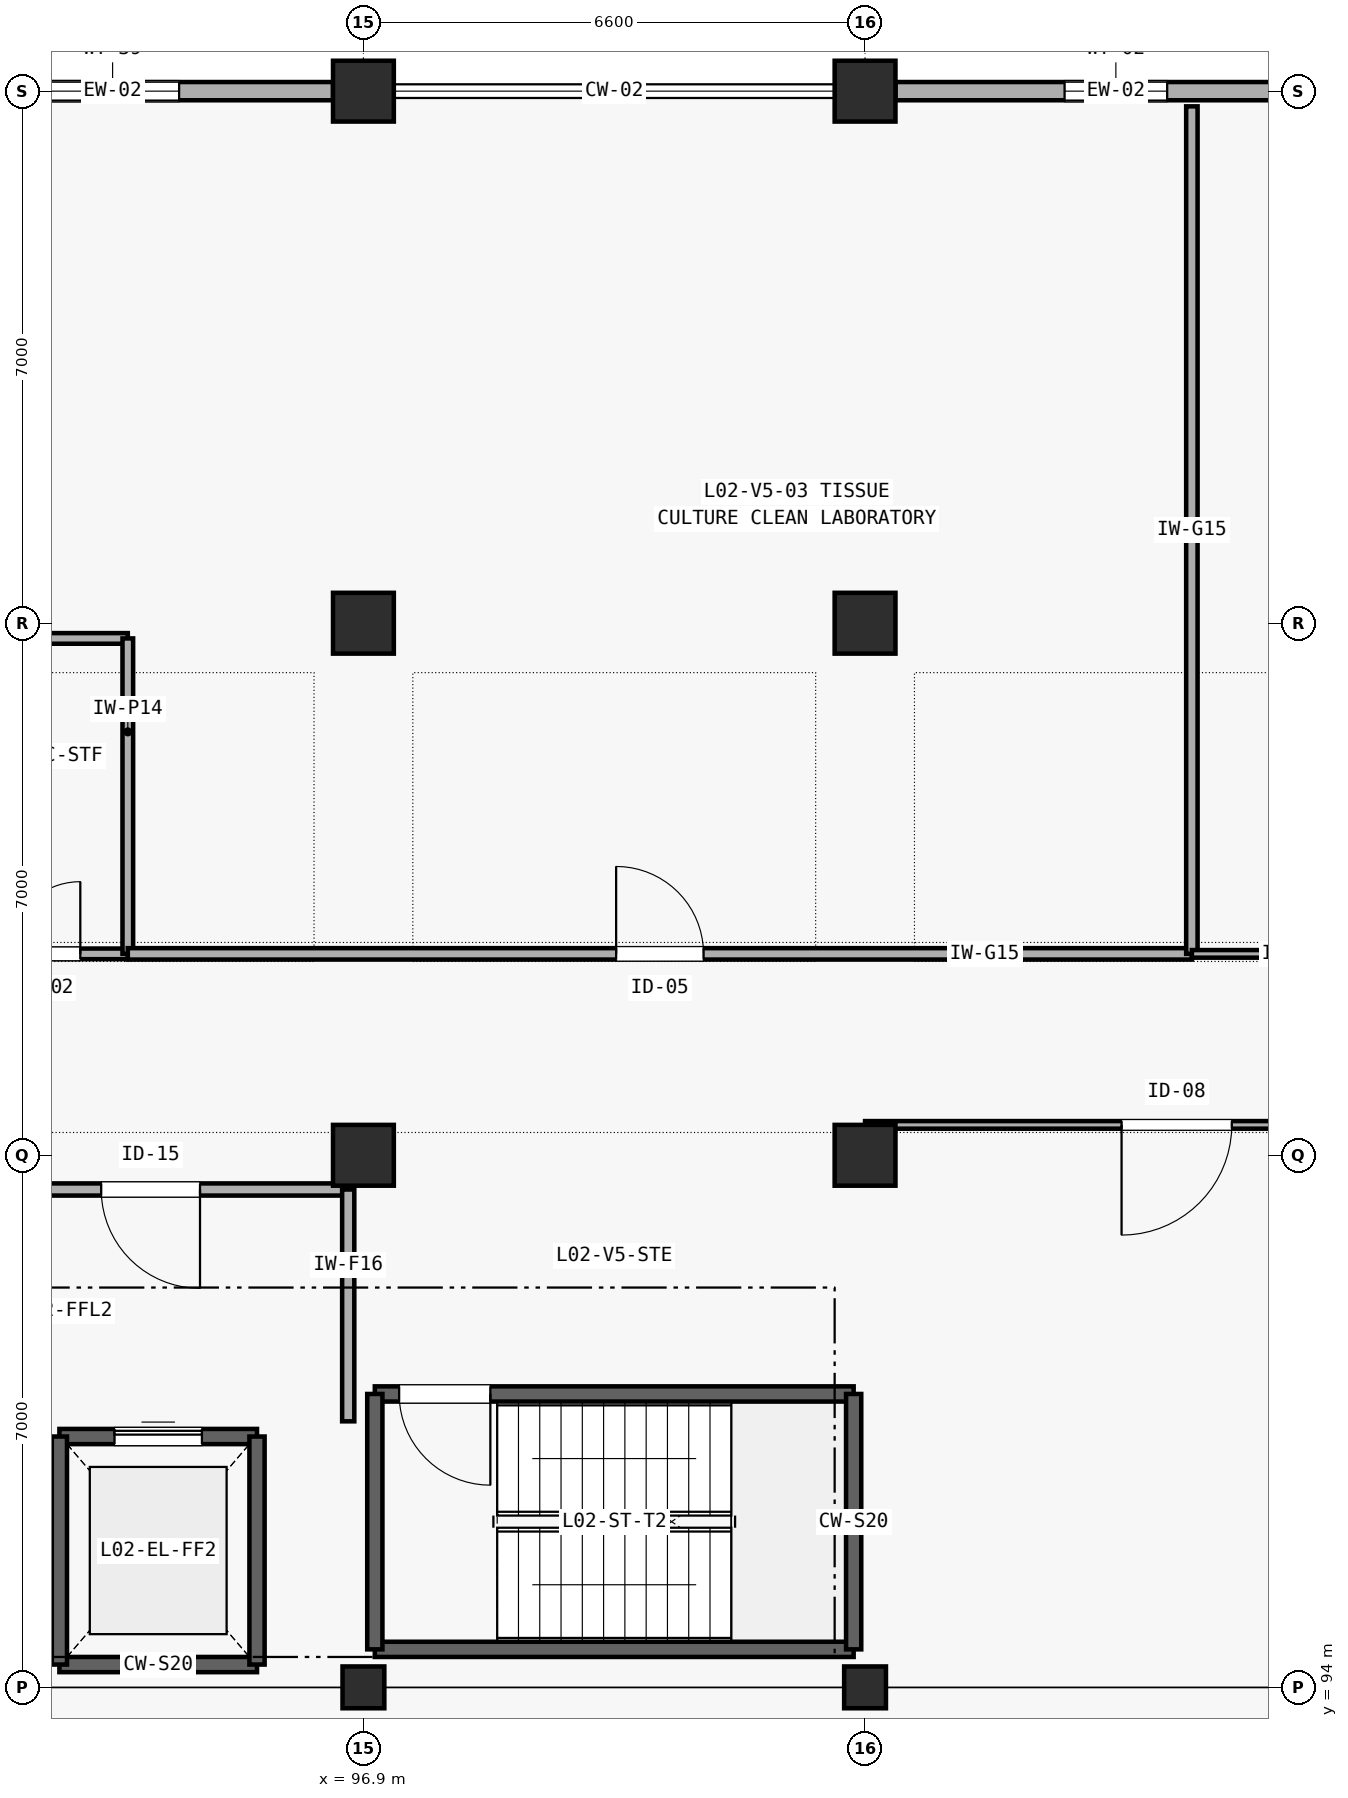
"""IFC4 building model, lengths in metres.
Left out: names, types, materials, properties, quantities, classifications, styles, units other than length and angle.
Written with IfcOpenShell. Run it as: python <this file> out.ifc"""

import sys

from ifc_helpers import new_model, si_unit, direction, frame, frame_2d, origin, origin_2d, place, context, subcontext, project, spatial, rectangle, extrude, element, fill, save


model = new_model("IFC4")
c1 = context("Model", 3, precision=1e-05, world=origin(), true_north=direction((0.0, 1.0)))
c2 = subcontext(c1, "Body", "Model", "MODEL_VIEW")
j1 = project(units=[si_unit("LENGTHUNIT", "METRE"), si_unit("PLANEANGLEUNIT", "RADIAN")], contexts=[c1])
p1 = place(None, origin())
s1 = spatial("IfcSite", under=j1, at=p1, CompositionType="ELEMENT")
p2 = place(p1, origin())
s2 = spatial("IfcBuilding", under=s1, at=p2, CompositionType="ELEMENT")
p3 = place(p2, frame((0.0, 0.0, 8.4)))
s3 = spatial("IfcBuildingStorey", under=s2, at=p3, CompositionType="ELEMENT", Elevation=8.4)
p4 = place(p3, frame((96.9, 94.0, 0.0), z_axis=(0.0, 0.0, 1.0), x_axis=(1.0, 0.0, 0.0)))
e1 = element("IfcColumn", 1, at=p4, inside=s3, PredefinedType="COLUMN", context=c2, shape_type="SweptSolid", body=[
    extrude(rectangle(XDim=0.55, YDim=0.55, at=origin_2d()), origin(), (0.0, 0.0, 1.0), 4.2),
])
for number, where, z_axis, x_axis in (
    (2, (96.9, 101.0, 0.0), (0.0, 0.0, 1.0), (1.0, 0.0, 0.0)),
    (3, (96.9, 108.0, 0.0), (0.0, 0.0, 1.0), (1.0, 0.0, 0.0)),
    (4, (96.9, 115.0, 0.0), (0.0, 0.0, 1.0), (1.0, 0.0, 0.0)),
):
    element("IfcColumn", number, at=place(p3, frame(where, z_axis=z_axis, x_axis=x_axis)), inside=s3, PredefinedType="COLUMN", context=c2, shape_type="SweptSolid", body=[
        extrude(rectangle(XDim=0.8, YDim=0.8, at=origin_2d()), origin(), (0.0, 0.0, 1.0), 4.2),
    ])
p5 = place(p3, frame((103.5, 94.0, 0.0), z_axis=(0.0, 0.0, 1.0), x_axis=(1.0, 0.0, 0.0)))
e5 = element("IfcColumn", 5, at=p5, inside=s3, PredefinedType="COLUMN", context=c2, shape_type="SweptSolid", body=[
    extrude(rectangle(XDim=0.55, YDim=0.55, at=origin_2d()), origin(), (0.0, 0.0, 1.0), 4.2),
])
for number, where, z_axis, x_axis in (
    (6, (103.5, 101.0, 0.0), (0.0, 0.0, 1.0), (1.0, 0.0, 0.0)),
    (7, (103.5, 108.0, 0.0), (0.0, 0.0, 1.0), (1.0, 0.0, 0.0)),
    (8, (103.5, 115.0, 0.0), (0.0, 0.0, 1.0), (1.0, 0.0, 0.0)),
):
    element("IfcColumn", number, at=place(p3, frame(where, z_axis=z_axis, x_axis=x_axis)), inside=s3, PredefinedType="COLUMN", context=c2, shape_type="SweptSolid", body=[
        extrude(rectangle(XDim=0.8, YDim=0.8, at=origin_2d()), origin(), (0.0, 0.0, 1.0), 4.2),
    ])
p6 = place(p3, frame((90.7, 115.0, 0.0), z_axis=(0.0, 0.0, 1.0), x_axis=(1.0, 0.0, 0.0)))
e9 = element("IfcWall", 9, at=p6, inside=s3, PredefinedType="SOLIDWALL", context=c2, shape_type="SweptSolid", body=[
    extrude(rectangle(XDim=5.8, YDim=0.24, at=frame_2d((2.9, 0.0))), origin(), (0.0, 0.0, 1.0), 3.365),
])
p7 = place(p6, frame((2.025, 0.0, 0.85)))
e10 = element("IfcOpeningElement", 10, at=p7, cuts=e9, PredefinedType="OPENING", context=c2, shape_type="SweptSolid", body=[
    extrude(rectangle(XDim=1.75, YDim=1.55, at=frame_2d((0.875, 0.775))), frame((0.0, 0.13, 0.0), z_axis=(0.0, -1.0, 0.0), x_axis=(1.0, 0.0, 0.0)), (0.0, 0.0, 1.0), 0.26),
])
p8 = place(p3, frame((103.9, 115.0, 0.0), z_axis=(0.0, 0.0, 1.0), x_axis=(1.0, 0.0, 0.0)))
e11 = element("IfcWall", 11, at=p8, inside=s3, PredefinedType="SOLIDWALL", context=c2, shape_type="SweptSolid", body=[
    extrude(rectangle(XDim=5.8, YDim=0.24, at=frame_2d((2.9, 0.0))), origin(), (0.0, 0.0, 1.0), 3.345),
])
p9 = place(p8, frame((2.225, 0.0, 0.85)))
e12 = element("IfcOpeningElement", 12, at=p9, cuts=e11, PredefinedType="OPENING", context=c2, shape_type="SweptSolid", body=[
    extrude(rectangle(XDim=1.35, YDim=1.35, at=frame_2d((0.675, 0.675))), frame((0.0, 0.13, 0.0), z_axis=(0.0, -1.0, 0.0), x_axis=(1.0, 0.0, 0.0)), (0.0, 0.0, 1.0), 0.26),
])
p10 = place(p3, frame((97.05, 94.5, 0.0), z_axis=(0.0, 0.0, 1.0), x_axis=(1.0, 0.0, 0.0)))
e13 = element("IfcWall", 13, at=p10, inside=s3, PredefinedType="SHEAR", context=c2, shape_type="SweptSolid", body=[
    extrude(rectangle(XDim=6.3, YDim=0.2, at=frame_2d((3.15, 0.0))), origin(), (0.0, 0.0, 1.0), 4.2),
])
p11 = place(p3, frame((97.05, 97.86, 0.0), z_axis=(0.0, 0.0, 1.0), x_axis=(1.0, 0.0, 0.0)))
e14 = element("IfcWall", 14, at=p11, inside=s3, PredefinedType="SHEAR", context=c2, shape_type="SweptSolid", body=[
    extrude(rectangle(XDim=6.3, YDim=0.2, at=frame_2d((3.15, 0.0))), origin(), (0.0, 0.0, 1.0), 4.2),
])
p12 = place(p11, frame((0.32, 0.0, 0.0)))
e15 = element("IfcOpeningElement", 15, at=p12, cuts=e14, PredefinedType="OPENING", context=c2, shape_type="SweptSolid", body=[
    extrude(rectangle(XDim=1.2, YDim=2.15, at=frame_2d((0.6, 1.075))), frame((0.0, 0.11, 0.0), z_axis=(0.0, -1.0, 0.0), x_axis=(1.0, 0.0, 0.0)), (0.0, 0.0, 1.0), 0.22),
])
for number, where, z_axis, x_axis in (
    (16, (97.05, 94.5, 0.0), (0.0, 0.0, 1.0), (0.0, 1.0, 0.0)),
    (17, (103.35, 94.5, 0.0), (0.0, 0.0, 1.0), (0.0, 1.0, 0.0)),
):
    element("IfcWall", number, at=place(p3, frame(where, z_axis=z_axis, x_axis=x_axis)), inside=s3, PredefinedType="SHEAR", context=c2, shape_type="SweptSolid", body=[
        extrude(rectangle(XDim=3.36, YDim=0.2, at=frame_2d((1.68, 0.0))), origin(), (0.0, 0.0, 1.0), 4.2),
    ])
p13 = place(p3, frame((92.9, 94.3, 0.0), z_axis=(0.0, 0.0, 1.0), x_axis=(1.0, 0.0, 0.0)))
e18 = element("IfcWall", 18, at=p13, inside=s3, PredefinedType="SHEAR", context=c2, shape_type="SweptSolid", body=[
    extrude(rectangle(XDim=2.6, YDim=0.2, at=frame_2d((1.3, 0.0))), origin(), (0.0, 0.0, 1.0), 4.2),
])
p14 = place(p3, frame((92.9, 97.3, 0.0), z_axis=(0.0, 0.0, 1.0), x_axis=(1.0, 0.0, 0.0)))
e19 = element("IfcWall", 19, at=p14, inside=s3, PredefinedType="SHEAR", context=c2, shape_type="SweptSolid", body=[
    extrude(rectangle(XDim=2.6, YDim=0.2, at=frame_2d((1.3, 0.0))), origin(), (0.0, 0.0, 1.0), 4.2),
])
p15 = place(p14, frame((0.725, 0.0, 0.0)))
e20 = element("IfcOpeningElement", 20, at=p15, cuts=e19, PredefinedType="OPENING", context=c2, shape_type="SweptSolid", body=[
    extrude(rectangle(XDim=1.15, YDim=2.2, at=frame_2d((0.575, 1.1))), frame((0.0, 0.11, 0.0), z_axis=(0.0, -1.0, 0.0), x_axis=(1.0, 0.0, 0.0)), (0.0, 0.0, 1.0), 0.22),
])
for number, where, z_axis, x_axis in (
    (21, (92.9, 94.3, 0.0), (0.0, 0.0, 1.0), (0.0, 1.0, 0.0)),
    (22, (95.5, 94.3, 0.0), (0.0, 0.0, 1.0), (0.0, 1.0, 0.0)),
):
    element("IfcWall", number, at=place(p3, frame(where, z_axis=z_axis, x_axis=x_axis)), inside=s3, PredefinedType="SHEAR", context=c2, shape_type="SweptSolid", body=[
        extrude(rectangle(XDim=3.0, YDim=0.2, at=frame_2d((1.5, 0.0))), origin(), (0.0, 0.0, 1.0), 4.2),
    ])
p16 = place(p3, frame((91.5, 100.55, 0.0), z_axis=(0.0, 0.0, 1.0), x_axis=(1.0, 0.0, 0.0)))
e23 = element("IfcWall", 23, at=p16, inside=s3, PredefinedType="SOLIDWALL", context=c2, shape_type="SweptSolid", body=[
    extrude(rectangle(XDim=5.2, YDim=0.16, at=frame_2d((2.6, 0.0))), origin(), (0.0, 0.0, 1.0), 3.9),
])
p17 = place(p16, frame((1.95, 0.0, 0.0)))
e24 = element("IfcOpeningElement", 24, at=p17, cuts=e23, PredefinedType="OPENING", context=c2, shape_type="SweptSolid", body=[
    extrude(rectangle(XDim=1.3, YDim=2.15, at=frame_2d((0.65, 1.075))), frame((0.0, 0.09, 0.0), z_axis=(0.0, -1.0, 0.0), x_axis=(1.0, 0.0, 0.0)), (0.0, 0.0, 1.0), 0.18),
])
p18 = place(p3, frame((96.7, 97.5, 0.0), z_axis=(0.0, 0.0, 1.0), x_axis=(0.0, 1.0, 0.0)))
e25 = element("IfcWall", 25, at=p18, inside=s3, PredefinedType="SOLIDWALL", context=c2, shape_type="SweptSolid", body=[
    extrude(rectangle(XDim=3.05, YDim=0.16, at=frame_2d((1.525, 0.0))), origin(), (0.0, 0.0, 1.0), 3.405),
])
p19 = place(p3, frame((91.6, 103.65, 0.0), z_axis=(0.0, 0.0, 1.0), x_axis=(1.0, 0.0, 0.0)))
e26 = element("IfcWall", 26, at=p19, inside=s3, PredefinedType="PLUMBINGWALL", context=c2, shape_type="SweptSolid", body=[
    extrude(rectangle(XDim=2.2, YDim=0.14, at=frame_2d((1.1, 0.0))), origin(), (0.0, 0.0, 1.0), 3.9),
])
p20 = place(p19, frame((0.625, 0.0, 0.0)))
e27 = element("IfcOpeningElement", 27, at=p20, cuts=e26, PredefinedType="OPENING", context=c2, shape_type="SweptSolid", body=[
    extrude(rectangle(XDim=0.95, YDim=2.1, at=frame_2d((0.475, 1.05))), frame((0.0, 0.08, 0.0), z_axis=(0.0, -1.0, 0.0), x_axis=(1.0, 0.0, 0.0)), (0.0, 0.0, 1.0), 0.16),
])
p21 = place(p3, frame((91.6, 107.8, 0.0), z_axis=(0.0, 0.0, 1.0), x_axis=(1.0, 0.0, 0.0)))
e28 = element("IfcWall", 28, at=p21, inside=s3, PredefinedType="PLUMBINGWALL", context=c2, shape_type="SweptSolid", body=[
    extrude(rectangle(XDim=2.2, YDim=0.14, at=frame_2d((1.1, 0.0))), origin(), (0.0, 0.0, 1.0), 3.365),
])
p22 = place(p3, frame((93.8, 103.65, 0.0), z_axis=(0.0, 0.0, 1.0), x_axis=(0.0, 1.0, 0.0)))
e29 = element("IfcWall", 29, at=p22, inside=s3, PredefinedType="PLUMBINGWALL", context=c2, shape_type="SweptSolid", body=[
    extrude(rectangle(XDim=4.15, YDim=0.14, at=frame_2d((2.075, 0.0))), origin(), (0.0, 0.0, 1.0), 3.9),
])
p23 = place(p3, frame((93.8, 103.65, 0.0), z_axis=(0.0, 0.0, 1.0), x_axis=(1.0, 0.0, 0.0)))
e30 = element("IfcWall", 30, at=p23, inside=s3, PredefinedType="PARTITIONING", context=c2, shape_type="SweptSolid", body=[
    extrude(rectangle(XDim=14.0, YDim=0.15, at=frame_2d((7.0, 0.0))), origin(), (0.0, 0.0, 1.0), 3.9),
])
p24 = place(p23, frame((6.425, 0.0, 0.0)))
e31 = element("IfcOpeningElement", 31, at=p24, cuts=e30, PredefinedType="OPENING", context=c2, shape_type="SweptSolid", body=[
    extrude(rectangle(XDim=1.15, YDim=2.15, at=frame_2d((0.575, 1.075))), frame((0.0, 0.085, 0.0), z_axis=(0.0, -1.0, 0.0), x_axis=(1.0, 0.0, 0.0)), (0.0, 0.0, 1.0), 0.17),
])
p25 = place(p3, frame((107.8, 103.65, 0.0), z_axis=(0.0, 0.0, 1.0), x_axis=(0.0, 1.0, 0.0)))
e32 = element("IfcWall", 32, at=p25, inside=s3, PredefinedType="PARTITIONING", context=c2, shape_type="SweptSolid", body=[
    extrude(rectangle(XDim=11.15, YDim=0.15, at=frame_2d((5.575, 0.0))), origin(), (0.0, 0.0, 1.0), 3.536),
])
p26 = place(p3, frame((107.8, 103.65, 0.0), z_axis=(0.0, 0.0, 1.0), x_axis=(1.0, 0.0, 0.0)))
e33 = element("IfcWall", 33, at=p26, inside=s3, PredefinedType="PARTITIONING", context=c2, shape_type="SweptSolid", body=[
    extrude(rectangle(XDim=8.7, YDim=0.1, at=frame_2d((4.35, 0.0))), origin(), (0.0, 0.0, 1.0), 3.9),
])
p27 = place(p26, frame((3.725, 0.0, 0.0)))
e34 = element("IfcOpeningElement", 34, at=p27, cuts=e33, PredefinedType="OPENING", context=c2, shape_type="SweptSolid", body=[
    extrude(rectangle(XDim=1.25, YDim=2.15, at=frame_2d((0.625, 1.075))), frame((0.0, 0.06, 0.0), z_axis=(0.0, -1.0, 0.0), x_axis=(1.0, 0.0, 0.0)), (0.0, 0.0, 1.0), 0.12),
])
p28 = place(p3, frame((103.5, 101.4, 0.0), z_axis=(0.0, 0.0, 1.0), x_axis=(1.0, 0.0, 0.0)))
e35 = element("IfcWall", 35, at=p28, inside=s3, PredefinedType="PARTITIONING", context=c2, shape_type="SweptSolid", body=[
    extrude(rectangle(XDim=13.0, YDim=0.1, at=frame_2d((6.5, 0.0))), origin(), (0.0, 0.0, 1.0), 3.9),
])
p29 = place(p28, frame((3.375, 0.0, 0.0)))
e36 = element("IfcOpeningElement", 36, at=p29, cuts=e35, PredefinedType="OPENING", context=c2, shape_type="SweptSolid", body=[
    extrude(rectangle(XDim=1.45, YDim=2.2, at=frame_2d((0.725, 1.1))), frame((0.0, 0.06, 0.0), z_axis=(0.0, -1.0, 0.0), x_axis=(1.0, 0.0, 0.0)), (0.0, 0.0, 1.0), 0.12),
])
p30 = place(p7, origin())
e37 = element("IfcWindow", 37, at=p30, inside=s3, PartitioningType="SINGLE_PANEL", PredefinedType="WINDOW", context=c2, shape_type="SweptSolid", body=[
    extrude(rectangle(XDim=1.75, YDim=1.55, at=frame_2d((0.875, 0.775))), frame((0.0, 0.03, 0.0), z_axis=(0.0, -1.0, 0.0), x_axis=(1.0, 0.0, 0.0)), (0.0, 0.0, 1.0), 0.06),
])
fill(e10, e37)
p31 = place(p9, origin())
e38 = element("IfcWindow", 38, at=p31, inside=s3, PartitioningType="SINGLE_PANEL", PredefinedType="WINDOW", context=c2, shape_type="SweptSolid", body=[
    extrude(rectangle(XDim=1.35, YDim=1.35, at=frame_2d((0.675, 0.675))), frame((0.0, 0.03, 0.0), z_axis=(0.0, -1.0, 0.0), x_axis=(1.0, 0.0, 0.0)), (0.0, 0.0, 1.0), 0.06),
])
fill(e12, e38)
p32 = place(p12, frame((1.2, 0.0, 0.0), z_axis=(0.0, 0.0, 1.0), x_axis=(-1.0, 0.0, 0.0)))
e39 = element("IfcDoor", 39, at=p32, inside=s3, OperationType="SINGLE_SWING_LEFT", PredefinedType="DOOR", context=c2, shape_type="SweptSolid", body=[
    extrude(rectangle(XDim=1.2, YDim=2.15, at=frame_2d((0.6, 1.075))), frame((0.0, 0.025, 0.0), z_axis=(0.0, -1.0, 0.0), x_axis=(1.0, 0.0, 0.0)), (0.0, 0.0, 1.0), 0.05),
])
fill(e15, e39)
p33 = place(p15, origin())
e40 = element("IfcDoor", 40, at=p33, inside=s3, OperationType="SLIDING_TO_LEFT", PredefinedType="DOOR", context=c2, shape_type="SweptSolid", body=[
    extrude(rectangle(XDim=1.15, YDim=2.2, at=frame_2d((0.575, 1.1))), frame((0.0, 0.025, 0.0), z_axis=(0.0, -1.0, 0.0), x_axis=(1.0, 0.0, 0.0)), (0.0, 0.0, 1.0), 0.05),
])
fill(e20, e40)
p34 = place(p17, frame((1.3, 0.0, 0.0), z_axis=(0.0, 0.0, 1.0), x_axis=(-1.0, 0.0, 0.0)))
e41 = element("IfcDoor", 41, at=p34, inside=s3, OperationType="SINGLE_SWING_LEFT", PredefinedType="DOOR", context=c2, shape_type="SweptSolid", body=[
    extrude(rectangle(XDim=1.3, YDim=2.15, at=frame_2d((0.65, 1.075))), frame((0.0, 0.025, 0.0), z_axis=(0.0, -1.0, 0.0), x_axis=(1.0, 0.0, 0.0)), (0.0, 0.0, 1.0), 0.05),
])
fill(e24, e41)
p35 = place(p20, origin())
e42 = element("IfcDoor", 42, at=p35, inside=s3, OperationType="SINGLE_SWING_RIGHT", PredefinedType="DOOR", context=c2, shape_type="SweptSolid", body=[
    extrude(rectangle(XDim=0.95, YDim=2.1, at=frame_2d((0.475, 1.05))), frame((0.0, 0.025, 0.0), z_axis=(0.0, -1.0, 0.0), x_axis=(1.0, 0.0, 0.0)), (0.0, 0.0, 1.0), 0.05),
])
fill(e27, e42)
p36 = place(p24, origin())
e43 = element("IfcDoor", 43, at=p36, inside=s3, OperationType="SINGLE_SWING_LEFT", PredefinedType="DOOR", context=c2, shape_type="SweptSolid", body=[
    extrude(rectangle(XDim=1.15, YDim=2.15, at=frame_2d((0.575, 1.075))), frame((0.0, 0.025, 0.0), z_axis=(0.0, -1.0, 0.0), x_axis=(1.0, 0.0, 0.0)), (0.0, 0.0, 1.0), 0.05),
])
fill(e31, e43)
p37 = place(p29, frame((1.45, 0.0, 0.0), z_axis=(0.0, 0.0, 1.0), x_axis=(-1.0, 0.0, 0.0)))
e44 = element("IfcDoor", 44, at=p37, inside=s3, OperationType="SINGLE_SWING_RIGHT", PredefinedType="DOOR", context=c2, shape_type="SweptSolid", body=[
    extrude(rectangle(XDim=1.45, YDim=2.2, at=frame_2d((0.725, 1.1))), frame((0.0, 0.025, 0.0), z_axis=(0.0, -1.0, 0.0), x_axis=(1.0, 0.0, 0.0)), (0.0, 0.0, 1.0), 0.05),
])
fill(e36, e44)
save(model, sys.argv[1])
